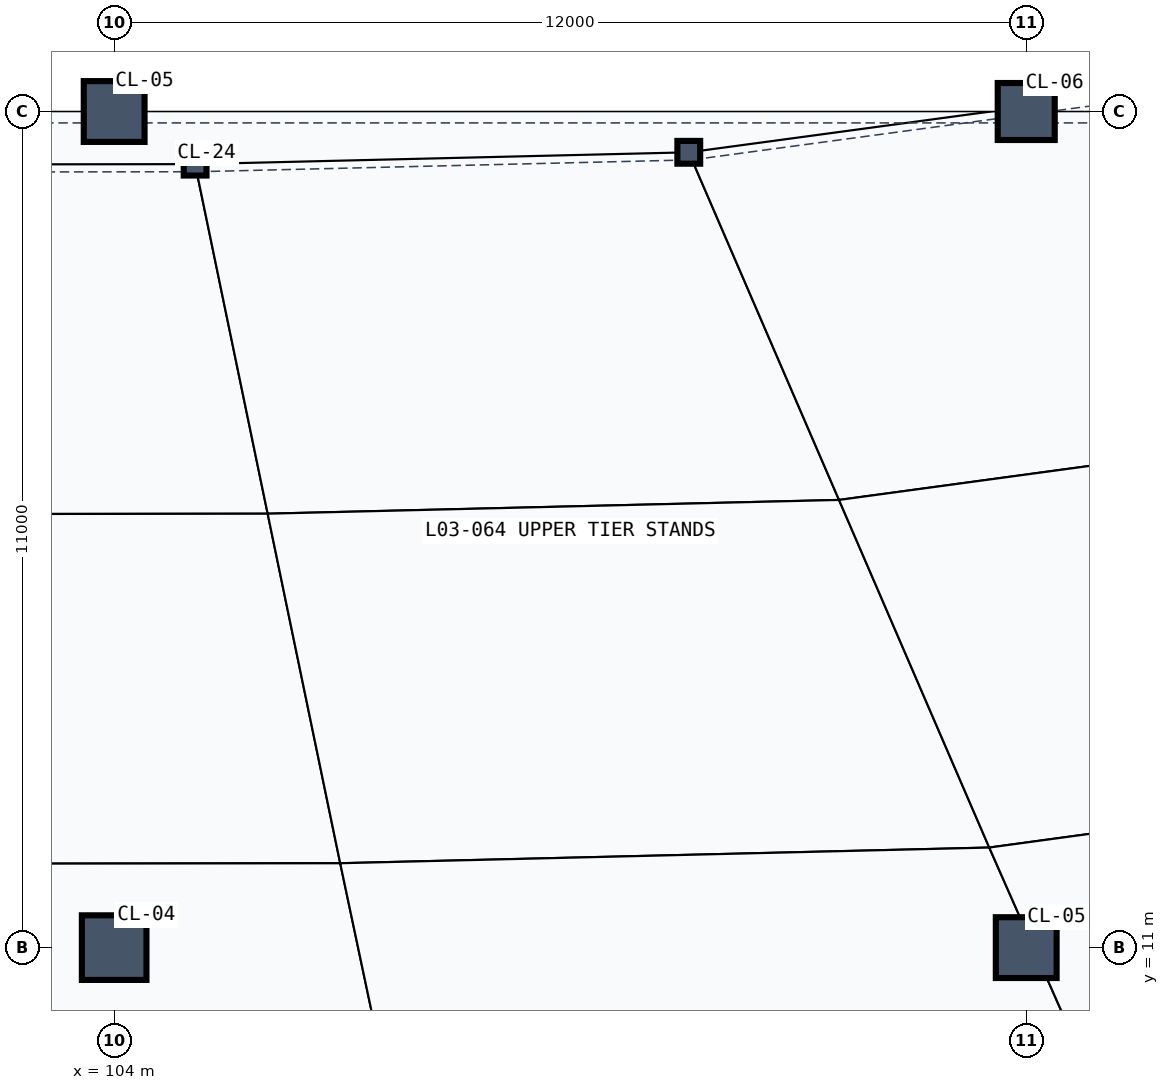
"""IFC4 building model, lengths in metres.
Left out: names, types, materials, properties, quantities, classifications, styles, units other than length and angle.
Written with IfcOpenShell. Run it as: python <this file> out.ifc"""

import sys

from ifc_helpers import new_model, si_unit, direction, frame, origin, origin_2d, place, context, subcontext, project, spatial, rectangle, hollow_rectangle, extrude, element, save


model = new_model("IFC4")
c1 = context("Model", 3, precision=1e-05, world=origin(), true_north=direction((0.0, 1.0)))
c2 = subcontext(c1, "Body", "Model", "MODEL_VIEW")
j1 = project(units=[si_unit("LENGTHUNIT", "METRE"), si_unit("PLANEANGLEUNIT", "RADIAN")], contexts=[c1])
p1 = place(None, origin())
s1 = spatial("IfcSite", under=j1, at=p1, CompositionType="ELEMENT")
p2 = place(p1, origin())
s2 = spatial("IfcBuilding", under=s1, at=p2, CompositionType="ELEMENT")
p3 = place(p2, frame((0.0, 0.0, 14.7)))
s3 = spatial("IfcBuildingStorey", under=s2, at=p3, CompositionType="ELEMENT", Elevation=14.7)
p4 = place(p3, frame((104.0, 11.0, 0.0), z_axis=(0.0, 0.0, 1.0), x_axis=(1.0, 0.0, 0.0)))
e1 = element("IfcColumn", 1, at=p4, inside=s3, PredefinedType="COLUMN", context=c2, shape_type="SweptSolid", body=[
    extrude(rectangle(XDim=0.85, YDim=0.85, at=origin_2d()), origin(), (0.0, 0.0, 1.0), 4.8),
])
for number, where, z_axis, x_axis in (
    (2, (104.0, 22.0, 0.0), (0.0, 0.0, 1.0), (1.0, 0.0, 0.0)),
    (3, (116.0, 11.0, 0.0), (0.0, 0.0, 1.0), (1.0, 0.0, 0.0)),
):
    element("IfcColumn", number, at=place(p3, frame(where, z_axis=z_axis, x_axis=x_axis)), inside=s3, PredefinedType="COLUMN", context=c2, shape_type="SweptSolid", body=[
        extrude(rectangle(XDim=0.8, YDim=0.8, at=origin_2d()), origin(), (0.0, 0.0, 1.0), 4.8),
    ])
p5 = place(p3, frame((116.0, 22.0, 0.0), z_axis=(0.0, 0.0, 1.0), x_axis=(1.0, 0.0, 0.0)))
e4 = element("IfcColumn", 4, at=p5, inside=s3, PredefinedType="COLUMN", context=c2, shape_type="SweptSolid", body=[
    extrude(rectangle(XDim=0.75, YDim=0.75, at=origin_2d()), origin(), (0.0, 0.0, 1.0), 4.8),
])
for number, where, z_axis, x_axis in (
    (5, (105.065, 21.308, 0.0), (0.0, 0.0, 1.0), (1.0, 0.0, 0.0)),
    (6, (111.56, 21.463, 0.0), (0.0, 0.0, 1.0), (1.0, 0.0, 0.0)),
):
    element("IfcColumn", number, at=place(p3, frame(where, z_axis=z_axis, x_axis=x_axis)), inside=s3, PredefinedType="COLUMN", context=c2, shape_type="SweptSolid", body=[
        extrude(hollow_rectangle(XDim=0.3, YDim=0.3, WallThickness=0.016, at=origin_2d()), origin(), (0.0, 0.0, 1.0), 0.32),
    ])
save(model, sys.argv[1])
